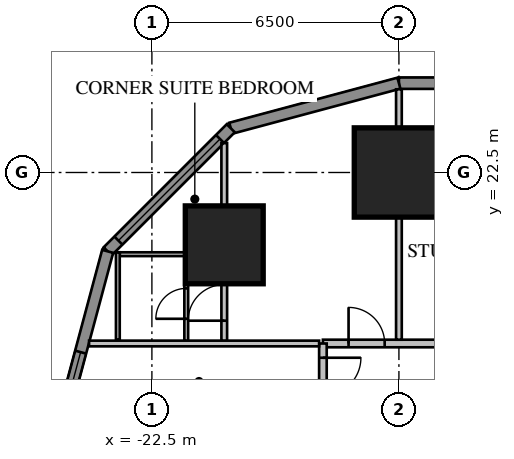
"""IFC4 building model, lengths in metres.
Left out: names, types, materials, properties, quantities, classifications, styles, units other than length and angle.
Written with IfcOpenShell. Run it as: python <this file> out.ifc"""

import sys

from ifc_helpers import new_model, si_unit, direction, frame, frame_2d, origin, origin_2d, place, context, subcontext, project, spatial, rectangle, extrude, element, fill, save


model = new_model("IFC4")
c1 = context("Model", 3, precision=1e-05, world=origin(), true_north=direction((0.0, 1.0)))
c2 = subcontext(c1, "Body", "Model", "MODEL_VIEW")
j1 = project(units=[si_unit("LENGTHUNIT", "METRE"), si_unit("PLANEANGLEUNIT", "RADIAN")], contexts=[c1])
p1 = place(None, origin())
s1 = spatial("IfcSite", under=j1, at=p1, CompositionType="ELEMENT")
p2 = place(p1, origin())
s2 = spatial("IfcBuilding", under=s1, at=p2, CompositionType="ELEMENT")
p3 = place(p2, frame((0.0, 0.0, 42.95)))
s3 = spatial("IfcBuildingStorey", under=s2, at=p3, CompositionType="ELEMENT", Elevation=42.95)
p4 = place(p3, frame((-16.0, 22.5, 0.0), z_axis=(0.0, 0.0, 1.0), x_axis=(1.0, 0.0, 0.0)))
e1 = element("IfcColumn", 1, at=p4, inside=s3, PredefinedType="COLUMN", context=c2, shape_type="SweptSolid", body=[
    extrude(rectangle(XDim=2.35, YDim=2.35, at=origin_2d()), origin(), (0.0, 0.0, 1.0), 3.85),
])
p5 = place(p3, frame((-20.596, 20.596, 0.0), z_axis=(0.0, 0.0, 1.0), x_axis=(1.0, 0.0, 0.0)))
e2 = element("IfcColumn", 2, at=p5, inside=s3, PredefinedType="COLUMN", context=c2, shape_type="SweptSolid", body=[
    extrude(rectangle(XDim=2.05, YDim=2.05, at=origin_2d()), origin(), (0.0, 0.0, 1.0), 3.85),
])
p6 = place(p3, frame((16.0, 24.85, 0.0), z_axis=(0.0, 0.0, 1.0), x_axis=(-1.0, 0.0, 0.0)))
e3 = element("IfcWall", 3, at=p6, inside=s3, PredefinedType="SOLIDWALL", context=c2, shape_type="SweptSolid", body=[
    extrude(rectangle(XDim=32.0, YDim=0.3, at=frame_2d((16.0, 0.0))), origin(), (0.0, 0.0, 1.0), 3.65),
])
p7 = place(p6, frame((1.2, 0.0, 0.75)))
e4 = element("IfcOpeningElement", 4, at=p7, cuts=e3, PredefinedType="OPENING", context=c2, shape_type="SweptSolid", body=[
    extrude(rectangle(XDim=1.6, YDim=1.8, at=frame_2d((0.8, 0.9))), frame((0.0, 0.17, 0.0), z_axis=(0.0, -1.0, 0.0), x_axis=(1.0, 0.0, 0.0)), (0.0, 0.0, 1.0), 0.34),
])
p8 = place(p6, frame((5.2, 0.0, 0.75)))
e5 = element("IfcOpeningElement", 5, at=p8, cuts=e3, PredefinedType="OPENING", context=c2, shape_type="SweptSolid", body=[
    extrude(rectangle(XDim=1.6, YDim=1.8, at=frame_2d((0.8, 0.9))), frame((0.0, 0.17, 0.0), z_axis=(0.0, -1.0, 0.0), x_axis=(1.0, 0.0, 0.0)), (0.0, 0.0, 1.0), 0.34),
])
p9 = place(p6, frame((17.2, 0.0, 0.75)))
e6 = element("IfcOpeningElement", 6, at=p9, cuts=e3, PredefinedType="OPENING", context=c2, shape_type="SweptSolid", body=[
    extrude(rectangle(XDim=1.6, YDim=1.8, at=frame_2d((0.8, 0.9))), frame((0.0, 0.17, 0.0), z_axis=(0.0, -1.0, 0.0), x_axis=(1.0, 0.0, 0.0)), (0.0, 0.0, 1.0), 0.34),
])
p10 = place(p6, frame((21.2, 0.0, 0.75)))
e7 = element("IfcOpeningElement", 7, at=p10, cuts=e3, PredefinedType="OPENING", context=c2, shape_type="SweptSolid", body=[
    extrude(rectangle(XDim=1.6, YDim=1.8, at=frame_2d((0.8, 0.9))), frame((0.0, 0.17, 0.0), z_axis=(0.0, -1.0, 0.0), x_axis=(1.0, 0.0, 0.0)), (0.0, 0.0, 1.0), 0.34),
])
p11 = place(p6, frame((25.2, 0.0, 0.75)))
e8 = element("IfcOpeningElement", 8, at=p11, cuts=e3, PredefinedType="OPENING", context=c2, shape_type="SweptSolid", body=[
    extrude(rectangle(XDim=1.6, YDim=1.8, at=frame_2d((0.8, 0.9))), frame((0.0, 0.17, 0.0), z_axis=(0.0, -1.0, 0.0), x_axis=(1.0, 0.0, 0.0)), (0.0, 0.0, 1.0), 0.34),
])
p12 = place(p6, frame((29.2, 0.0, 0.75)))
e9 = element("IfcOpeningElement", 9, at=p12, cuts=e3, PredefinedType="OPENING", context=c2, shape_type="SweptSolid", body=[
    extrude(rectangle(XDim=1.6, YDim=1.8, at=frame_2d((0.8, 0.9))), frame((0.0, 0.17, 0.0), z_axis=(0.0, -1.0, 0.0), x_axis=(1.0, 0.0, 0.0)), (0.0, 0.0, 1.0), 0.34),
])
p13 = place(p6, frame((8.8, 0.0, 0.75)))
e10 = element("IfcOpeningElement", 10, at=p13, cuts=e3, PredefinedType="OPENING", context=c2, shape_type="SweptSolid", body=[
    extrude(rectangle(XDim=2.4, YDim=1.8, at=frame_2d((1.2, 0.9))), frame((0.0, 0.17, 0.0), z_axis=(0.0, -1.0, 0.0), x_axis=(1.0, 0.0, 0.0)), (0.0, 0.0, 1.0), 0.34),
])
p14 = place(p6, frame((13.812, 0.0, 0.0)))
e11 = element("IfcOpeningElement", 11, at=p14, cuts=e3, PredefinedType="OPENING", context=c2, shape_type="SweptSolid", body=[
    extrude(rectangle(XDim=1.0, YDim=2.4, at=frame_2d((0.5, 1.2))), frame((0.0, 0.17, 0.0), z_axis=(0.0, -1.0, 0.0), x_axis=(1.0, 0.0, 0.0)), (0.0, 0.0, 1.0), 0.34),
])
p15 = place(p3, frame((-16.0, 24.85, 0.0), z_axis=(0.0, 0.0, 1.0), x_axis=(-0.965920218567, -0.258839972501, 0.0)))
e12 = element("IfcWall", 12, at=p15, inside=s3, PredefinedType="SOLIDWALL", context=c2, shape_type="SweptSolid", body=[
    extrude(rectangle(XDim=4.581, YDim=0.3, at=frame_2d((2.291, 0.0))), origin(), (0.0, 0.0, 1.0), 3.65),
])
p16 = place(p3, frame((-20.425, 23.664, 0.0), z_axis=(0.0, 0.0, 1.0), x_axis=(-0.707106781187, -0.707106781187, 0.0)))
e13 = element("IfcWall", 13, at=p16, inside=s3, PredefinedType="SOLIDWALL", context=c2, shape_type="SweptSolid", body=[
    extrude(rectangle(XDim=4.581, YDim=0.3, at=frame_2d((2.291, 0.0))), origin(), (0.0, 0.0, 1.0), 3.65),
])
p17 = place(p16, frame((0.4, 0.0, 0.75)))
e14 = element("IfcOpeningElement", 14, at=p17, cuts=e13, PredefinedType="OPENING", context=c2, shape_type="SweptSolid", body=[
    extrude(rectangle(XDim=3.781, YDim=1.8, at=frame_2d((1.891, 0.9))), frame((0.0, 0.17, 0.0), z_axis=(0.0, -1.0, 0.0), x_axis=(1.0, 0.0, 0.0)), (0.0, 0.0, 1.0), 0.34),
])
p18 = place(p3, frame((-23.664, 20.425, 0.0), z_axis=(0.0, 0.0, 1.0), x_axis=(-0.258839972501, -0.965920218567, 0.0)))
e15 = element("IfcWall", 15, at=p18, inside=s3, PredefinedType="SOLIDWALL", context=c2, shape_type="SweptSolid", body=[
    extrude(rectangle(XDim=4.581, YDim=0.3, at=frame_2d((2.291, 0.0))), origin(), (0.0, 0.0, 1.0), 3.65),
])
p19 = place(p18, frame((2.746, 0.0, 0.75)))
e16 = element("IfcOpeningElement", 16, at=p19, cuts=e15, PredefinedType="OPENING", context=c2, shape_type="SweptSolid", body=[
    extrude(rectangle(XDim=1.6, YDim=1.8, at=frame_2d((0.8, 0.9))), frame((0.0, 0.17, 0.0), z_axis=(0.0, -1.0, 0.0), x_axis=(1.0, 0.0, 0.0)), (0.0, 0.0, 1.0), 0.34),
])
p20 = place(p3, frame((18.0, 18.0, 0.0), z_axis=(0.0, 0.0, 1.0), x_axis=(-1.0, 0.0, 0.0)))
e17 = element("IfcWall", 17, at=p20, inside=s3, PredefinedType="PARTITIONING", context=c2, shape_type="SweptSolid", body=[
    extrude(rectangle(XDim=36.0, YDim=0.2, at=frame_2d((18.0, 0.0))), origin(), (0.0, 0.0, 1.0), 3.65),
])
p21 = place(p20, frame((0.375, 0.0, 0.0)))
e18 = element("IfcOpeningElement", 18, at=p21, cuts=e17, PredefinedType="OPENING", context=c2, shape_type="SweptSolid", body=[
    extrude(rectangle(XDim=1.0, YDim=2.1, at=frame_2d((0.5, 1.05))), frame((0.0, 0.12, 0.0), z_axis=(0.0, -1.0, 0.0), x_axis=(1.0, 0.0, 0.0)), (0.0, 0.0, 1.0), 0.24),
])
p22 = place(p20, frame((3.95, 0.0, 0.0)))
e19 = element("IfcOpeningElement", 19, at=p22, cuts=e17, PredefinedType="OPENING", context=c2, shape_type="SweptSolid", body=[
    extrude(rectangle(XDim=0.95, YDim=2.1, at=frame_2d((0.475, 1.05))), frame((0.0, 0.12, 0.0), z_axis=(0.0, -1.0, 0.0), x_axis=(1.0, 0.0, 0.0)), (0.0, 0.0, 1.0), 0.24),
])
p23 = place(p20, frame((7.95, 0.0, 0.0)))
e20 = element("IfcOpeningElement", 20, at=p23, cuts=e17, PredefinedType="OPENING", context=c2, shape_type="SweptSolid", body=[
    extrude(rectangle(XDim=0.95, YDim=2.1, at=frame_2d((0.475, 1.05))), frame((0.0, 0.12, 0.0), z_axis=(0.0, -1.0, 0.0), x_axis=(1.0, 0.0, 0.0)), (0.0, 0.0, 1.0), 0.24),
])
p24 = place(p20, frame((19.95, 0.0, 0.0)))
e21 = element("IfcOpeningElement", 21, at=p24, cuts=e17, PredefinedType="OPENING", context=c2, shape_type="SweptSolid", body=[
    extrude(rectangle(XDim=0.95, YDim=2.1, at=frame_2d((0.475, 1.05))), frame((0.0, 0.12, 0.0), z_axis=(0.0, -1.0, 0.0), x_axis=(1.0, 0.0, 0.0)), (0.0, 0.0, 1.0), 0.24),
])
p25 = place(p20, frame((23.95, 0.0, 0.0)))
e22 = element("IfcOpeningElement", 22, at=p25, cuts=e17, PredefinedType="OPENING", context=c2, shape_type="SweptSolid", body=[
    extrude(rectangle(XDim=0.95, YDim=2.1, at=frame_2d((0.475, 1.05))), frame((0.0, 0.12, 0.0), z_axis=(0.0, -1.0, 0.0), x_axis=(1.0, 0.0, 0.0)), (0.0, 0.0, 1.0), 0.24),
])
p26 = place(p20, frame((27.95, 0.0, 0.0)))
e23 = element("IfcOpeningElement", 23, at=p26, cuts=e17, PredefinedType="OPENING", context=c2, shape_type="SweptSolid", body=[
    extrude(rectangle(XDim=0.95, YDim=2.1, at=frame_2d((0.475, 1.05))), frame((0.0, 0.12, 0.0), z_axis=(0.0, -1.0, 0.0), x_axis=(1.0, 0.0, 0.0)), (0.0, 0.0, 1.0), 0.24),
])
p27 = place(p20, frame((31.95, 0.0, 0.0)))
e24 = element("IfcOpeningElement", 24, at=p27, cuts=e17, PredefinedType="OPENING", context=c2, shape_type="SweptSolid", body=[
    extrude(rectangle(XDim=0.95, YDim=2.1, at=frame_2d((0.475, 1.05))), frame((0.0, 0.12, 0.0), z_axis=(0.0, -1.0, 0.0), x_axis=(1.0, 0.0, 0.0)), (0.0, 0.0, 1.0), 0.24),
])
p28 = place(p20, frame((34.375, 0.0, 0.0)))
e25 = element("IfcOpeningElement", 25, at=p28, cuts=e17, PredefinedType="OPENING", context=c2, shape_type="SweptSolid", body=[
    extrude(rectangle(XDim=0.95, YDim=2.1, at=frame_2d((0.475, 1.05))), frame((0.0, 0.12, 0.0), z_axis=(0.0, -1.0, 0.0), x_axis=(1.0, 0.0, 0.0)), (0.0, 0.0, 1.0), 0.24),
])
p29 = place(p20, frame((11.2, 0.0, 0.0)))
e26 = element("IfcOpeningElement", 26, at=p29, cuts=e17, PredefinedType="OPENING", context=c2, shape_type="SweptSolid", body=[
    extrude(rectangle(XDim=1.0, YDim=2.1, at=frame_2d((0.5, 1.05))), frame((0.0, 0.12, 0.0), z_axis=(0.0, -1.0, 0.0), x_axis=(1.0, 0.0, 0.0)), (0.0, 0.0, 1.0), 0.24),
])
p30 = place(p20, frame((15.2, 0.0, 0.0)))
e27 = element("IfcOpeningElement", 27, at=p30, cuts=e17, PredefinedType="OPENING", context=c2, shape_type="SweptSolid", body=[
    extrude(rectangle(XDim=1.0, YDim=2.1, at=frame_2d((0.5, 1.05))), frame((0.0, 0.12, 0.0), z_axis=(0.0, -1.0, 0.0), x_axis=(1.0, 0.0, 0.0)), (0.0, 0.0, 1.0), 0.24),
])
p31 = place(p3, frame((-16.0, 18.1, 0.0), z_axis=(0.0, 0.0, 1.0), x_axis=(0.0, 1.0, 0.0)))
e28 = element("IfcWall", 28, at=p31, inside=s3, PredefinedType="PARTITIONING", context=c2, shape_type="SweptSolid", body=[
    extrude(rectangle(XDim=6.589, YDim=0.15, at=frame_2d((3.295, 0.0))), origin(), (0.0, 0.0, 1.0), 3.65),
])
p32 = place(p3, frame((-21.596, 18.065, 0.0), z_axis=(0.0, 0.0, 1.0), x_axis=(0.0, 1.0, 0.0)))
e29 = element("IfcWall", 29, at=p32, inside=s3, PredefinedType="PARTITIONING", context=c2, shape_type="SweptSolid", body=[
    extrude(rectangle(XDim=2.335, YDim=0.1, at=frame_2d((1.167, 0.0))), origin(), (0.0, 0.0, 1.0), 3.65),
])
p33 = place(p32, frame((0.585, 0.0, 0.0)))
e30 = element("IfcOpeningElement", 30, at=p33, cuts=e29, PredefinedType="OPENING", context=c2, shape_type="SweptSolid", body=[
    extrude(rectangle(XDim=0.8, YDim=2.1, at=frame_2d((0.4, 1.05))), frame((0.0, 0.07, 0.0), z_axis=(0.0, -1.0, 0.0), x_axis=(1.0, 0.0, 0.0)), (0.0, 0.0, 1.0), 0.14),
])
p34 = place(p3, frame((-21.646, 20.35, 0.0), z_axis=(0.0, 0.0, 1.0), x_axis=(-1.0, 0.0, 0.0)))
e31 = element("IfcWall", 31, at=p34, inside=s3, PredefinedType="PARTITIONING", context=c2, shape_type="SweptSolid", body=[
    extrude(rectangle(XDim=1.7, YDim=0.1, at=frame_2d((0.85, 0.0))), origin(), (0.0, 0.0, 1.0), 3.65),
])
p35 = place(p3, frame((-23.396, 18.1, 0.0), z_axis=(0.0, 0.0, 1.0), x_axis=(0.0, 1.0, 0.0)))
e32 = element("IfcWall", 32, at=p35, inside=s3, PredefinedType="PARTITIONING", context=c2, shape_type="SweptSolid", body=[
    extrude(rectangle(XDim=2.3, YDim=0.1, at=frame_2d((1.15, 0.0))), origin(), (0.0, 0.0, 1.0), 3.65),
])
p36 = place(p3, frame((-20.596, 18.065, 0.0), z_axis=(0.0, 0.0, 1.0), x_axis=(0.0, 1.0, 0.0)))
e33 = element("IfcWall", 33, at=p36, inside=s3, PredefinedType="PARTITIONING", context=c2, shape_type="SweptSolid", body=[
    extrude(rectangle(XDim=5.209, YDim=0.15, at=frame_2d((2.604, 0.0))), origin(), (0.0, 0.0, 1.0), 3.65),
])
p37 = place(p36, frame((0.535, 0.0, 0.0)))
e34 = element("IfcOpeningElement", 34, at=p37, cuts=e33, PredefinedType="OPENING", context=c2, shape_type="SweptSolid", body=[
    extrude(rectangle(XDim=0.95, YDim=2.1, at=frame_2d((0.475, 1.05))), frame((0.0, 0.095, 0.0), z_axis=(0.0, -1.0, 0.0), x_axis=(1.0, 0.0, 0.0)), (0.0, 0.0, 1.0), 0.19),
])
p38 = place(p3, frame((-18.0, 18.0, 0.0), z_axis=(0.0, 0.0, 1.0), x_axis=(0.0, -1.0, 0.0)))
e35 = element("IfcWall", 35, at=p38, inside=s3, PredefinedType="PARTITIONING", context=c2, shape_type="SweptSolid", body=[
    extrude(rectangle(XDim=36.0, YDim=0.2, at=frame_2d((18.0, 0.0))), origin(), (0.0, 0.0, 1.0), 3.65),
])
p39 = place(p38, frame((0.375, 0.0, 0.0)))
e36 = element("IfcOpeningElement", 36, at=p39, cuts=e35, PredefinedType="OPENING", context=c2, shape_type="SweptSolid", body=[
    extrude(rectangle(XDim=1.0, YDim=2.1, at=frame_2d((0.5, 1.05))), frame((0.0, 0.12, 0.0), z_axis=(0.0, -1.0, 0.0), x_axis=(1.0, 0.0, 0.0)), (0.0, 0.0, 1.0), 0.24),
])
p40 = place(p38, frame((2.375, 0.0, 0.0)))
e37 = element("IfcOpeningElement", 37, at=p40, cuts=e35, PredefinedType="OPENING", context=c2, shape_type="SweptSolid", body=[
    extrude(rectangle(XDim=0.95, YDim=2.1, at=frame_2d((0.475, 1.05))), frame((0.0, 0.12, 0.0), z_axis=(0.0, -1.0, 0.0), x_axis=(1.0, 0.0, 0.0)), (0.0, 0.0, 1.0), 0.24),
])
p41 = place(p38, frame((7.95, 0.0, 0.0)))
e38 = element("IfcOpeningElement", 38, at=p41, cuts=e35, PredefinedType="OPENING", context=c2, shape_type="SweptSolid", body=[
    extrude(rectangle(XDim=0.95, YDim=2.1, at=frame_2d((0.475, 1.05))), frame((0.0, 0.12, 0.0), z_axis=(0.0, -1.0, 0.0), x_axis=(1.0, 0.0, 0.0)), (0.0, 0.0, 1.0), 0.24),
])
p42 = place(p38, frame((18.375, 0.0, 0.0)))
e39 = element("IfcOpeningElement", 39, at=p42, cuts=e35, PredefinedType="OPENING", context=c2, shape_type="SweptSolid", body=[
    extrude(rectangle(XDim=0.95, YDim=2.1, at=frame_2d((0.475, 1.05))), frame((0.0, 0.12, 0.0), z_axis=(0.0, -1.0, 0.0), x_axis=(1.0, 0.0, 0.0)), (0.0, 0.0, 1.0), 0.24),
])
p43 = place(p38, frame((23.95, 0.0, 0.0)))
e40 = element("IfcOpeningElement", 40, at=p43, cuts=e35, PredefinedType="OPENING", context=c2, shape_type="SweptSolid", body=[
    extrude(rectangle(XDim=0.95, YDim=2.1, at=frame_2d((0.475, 1.05))), frame((0.0, 0.12, 0.0), z_axis=(0.0, -1.0, 0.0), x_axis=(1.0, 0.0, 0.0)), (0.0, 0.0, 1.0), 0.24),
])
p44 = place(p38, frame((26.375, 0.0, 0.0)))
e41 = element("IfcOpeningElement", 41, at=p44, cuts=e35, PredefinedType="OPENING", context=c2, shape_type="SweptSolid", body=[
    extrude(rectangle(XDim=0.95, YDim=2.1, at=frame_2d((0.475, 1.05))), frame((0.0, 0.12, 0.0), z_axis=(0.0, -1.0, 0.0), x_axis=(1.0, 0.0, 0.0)), (0.0, 0.0, 1.0), 0.24),
])
p45 = place(p38, frame((31.95, 0.0, 0.0)))
e42 = element("IfcOpeningElement", 42, at=p45, cuts=e35, PredefinedType="OPENING", context=c2, shape_type="SweptSolid", body=[
    extrude(rectangle(XDim=0.95, YDim=2.1, at=frame_2d((0.475, 1.05))), frame((0.0, 0.12, 0.0), z_axis=(0.0, -1.0, 0.0), x_axis=(1.0, 0.0, 0.0)), (0.0, 0.0, 1.0), 0.24),
])
p46 = place(p38, frame((34.375, 0.0, 0.0)))
e43 = element("IfcOpeningElement", 43, at=p46, cuts=e35, PredefinedType="OPENING", context=c2, shape_type="SweptSolid", body=[
    extrude(rectangle(XDim=0.95, YDim=2.1, at=frame_2d((0.475, 1.05))), frame((0.0, 0.12, 0.0), z_axis=(0.0, -1.0, 0.0), x_axis=(1.0, 0.0, 0.0)), (0.0, 0.0, 1.0), 0.24),
])
p47 = place(p38, frame((11.2, 0.0, 0.0)))
e44 = element("IfcOpeningElement", 44, at=p47, cuts=e35, PredefinedType="OPENING", context=c2, shape_type="SweptSolid", body=[
    extrude(rectangle(XDim=1.0, YDim=2.1, at=frame_2d((0.5, 1.05))), frame((0.0, 0.12, 0.0), z_axis=(0.0, -1.0, 0.0), x_axis=(1.0, 0.0, 0.0)), (0.0, 0.0, 1.0), 0.24),
])
p48 = place(p3, frame((-18.1, 18.0, 0.0), z_axis=(0.0, 0.0, 1.0), x_axis=(-1.0, 0.0, 0.0)))
e45 = element("IfcWall", 45, at=p48, inside=s3, PredefinedType="PARTITIONING", context=c2, shape_type="SweptSolid", body=[
    extrude(rectangle(XDim=6.053, YDim=0.15, at=frame_2d((3.027, 0.0))), origin(), (0.0, 0.0, 1.0), 3.65),
])
p49 = place(p17, origin())
e46 = element("IfcWindow", 46, at=p49, inside=s3, PartitioningType="SINGLE_PANEL", PredefinedType="WINDOW", context=c2, shape_type="SweptSolid", body=[
    extrude(rectangle(XDim=3.781, YDim=1.8, at=frame_2d((1.891, 0.9))), frame((0.0, 0.03, 0.0), z_axis=(0.0, -1.0, 0.0), x_axis=(1.0, 0.0, 0.0)), (0.0, 0.0, 1.0), 0.06),
])
fill(e14, e46)
p50 = place(p19, origin())
e47 = element("IfcWindow", 47, at=p50, inside=s3, PartitioningType="SINGLE_PANEL", PredefinedType="WINDOW", context=c2, shape_type="SweptSolid", body=[
    extrude(rectangle(XDim=1.6, YDim=1.8, at=frame_2d((0.8, 0.9))), frame((0.0, 0.03, 0.0), z_axis=(0.0, -1.0, 0.0), x_axis=(1.0, 0.0, 0.0)), (0.0, 0.0, 1.0), 0.06),
])
fill(e16, e47)
p51 = place(p28, origin())
e48 = element("IfcDoor", 48, at=p51, inside=s3, OperationType="SINGLE_SWING_RIGHT", PredefinedType="DOOR", context=c2, shape_type="SweptSolid", body=[
    extrude(rectangle(XDim=0.95, YDim=2.1, at=frame_2d((0.475, 1.05))), frame((0.0, 0.025, 0.0), z_axis=(0.0, -1.0, 0.0), x_axis=(1.0, 0.0, 0.0)), (0.0, 0.0, 1.0), 0.05),
])
fill(e25, e48)
p52 = place(p33, origin())
e49 = element("IfcDoor", 49, at=p52, inside=s3, OperationType="SINGLE_SWING_LEFT", PredefinedType="DOOR", context=c2, shape_type="SweptSolid", body=[
    extrude(rectangle(XDim=0.8, YDim=2.1, at=frame_2d((0.4, 1.05))), frame((0.0, 0.025, 0.0), z_axis=(0.0, -1.0, 0.0), x_axis=(1.0, 0.0, 0.0)), (0.0, 0.0, 1.0), 0.05),
])
fill(e30, e49)
p53 = place(p37, origin())
e50 = element("IfcDoor", 50, at=p53, inside=s3, OperationType="SINGLE_SWING_LEFT", PredefinedType="DOOR", context=c2, shape_type="SweptSolid", body=[
    extrude(rectangle(XDim=0.95, YDim=2.1, at=frame_2d((0.475, 1.05))), frame((0.0, 0.025, 0.0), z_axis=(0.0, -1.0, 0.0), x_axis=(1.0, 0.0, 0.0)), (0.0, 0.0, 1.0), 0.05),
])
fill(e34, e50)
p54 = place(p39, origin())
e51 = element("IfcDoor", 51, at=p54, inside=s3, OperationType="SINGLE_SWING_LEFT", PredefinedType="DOOR", context=c2, shape_type="SweptSolid", body=[
    extrude(rectangle(XDim=1.0, YDim=2.1, at=frame_2d((0.5, 1.05))), frame((0.0, 0.025, 0.0), z_axis=(0.0, -1.0, 0.0), x_axis=(1.0, 0.0, 0.0)), (0.0, 0.0, 1.0), 0.05),
])
fill(e36, e51)
save(model, sys.argv[1])
